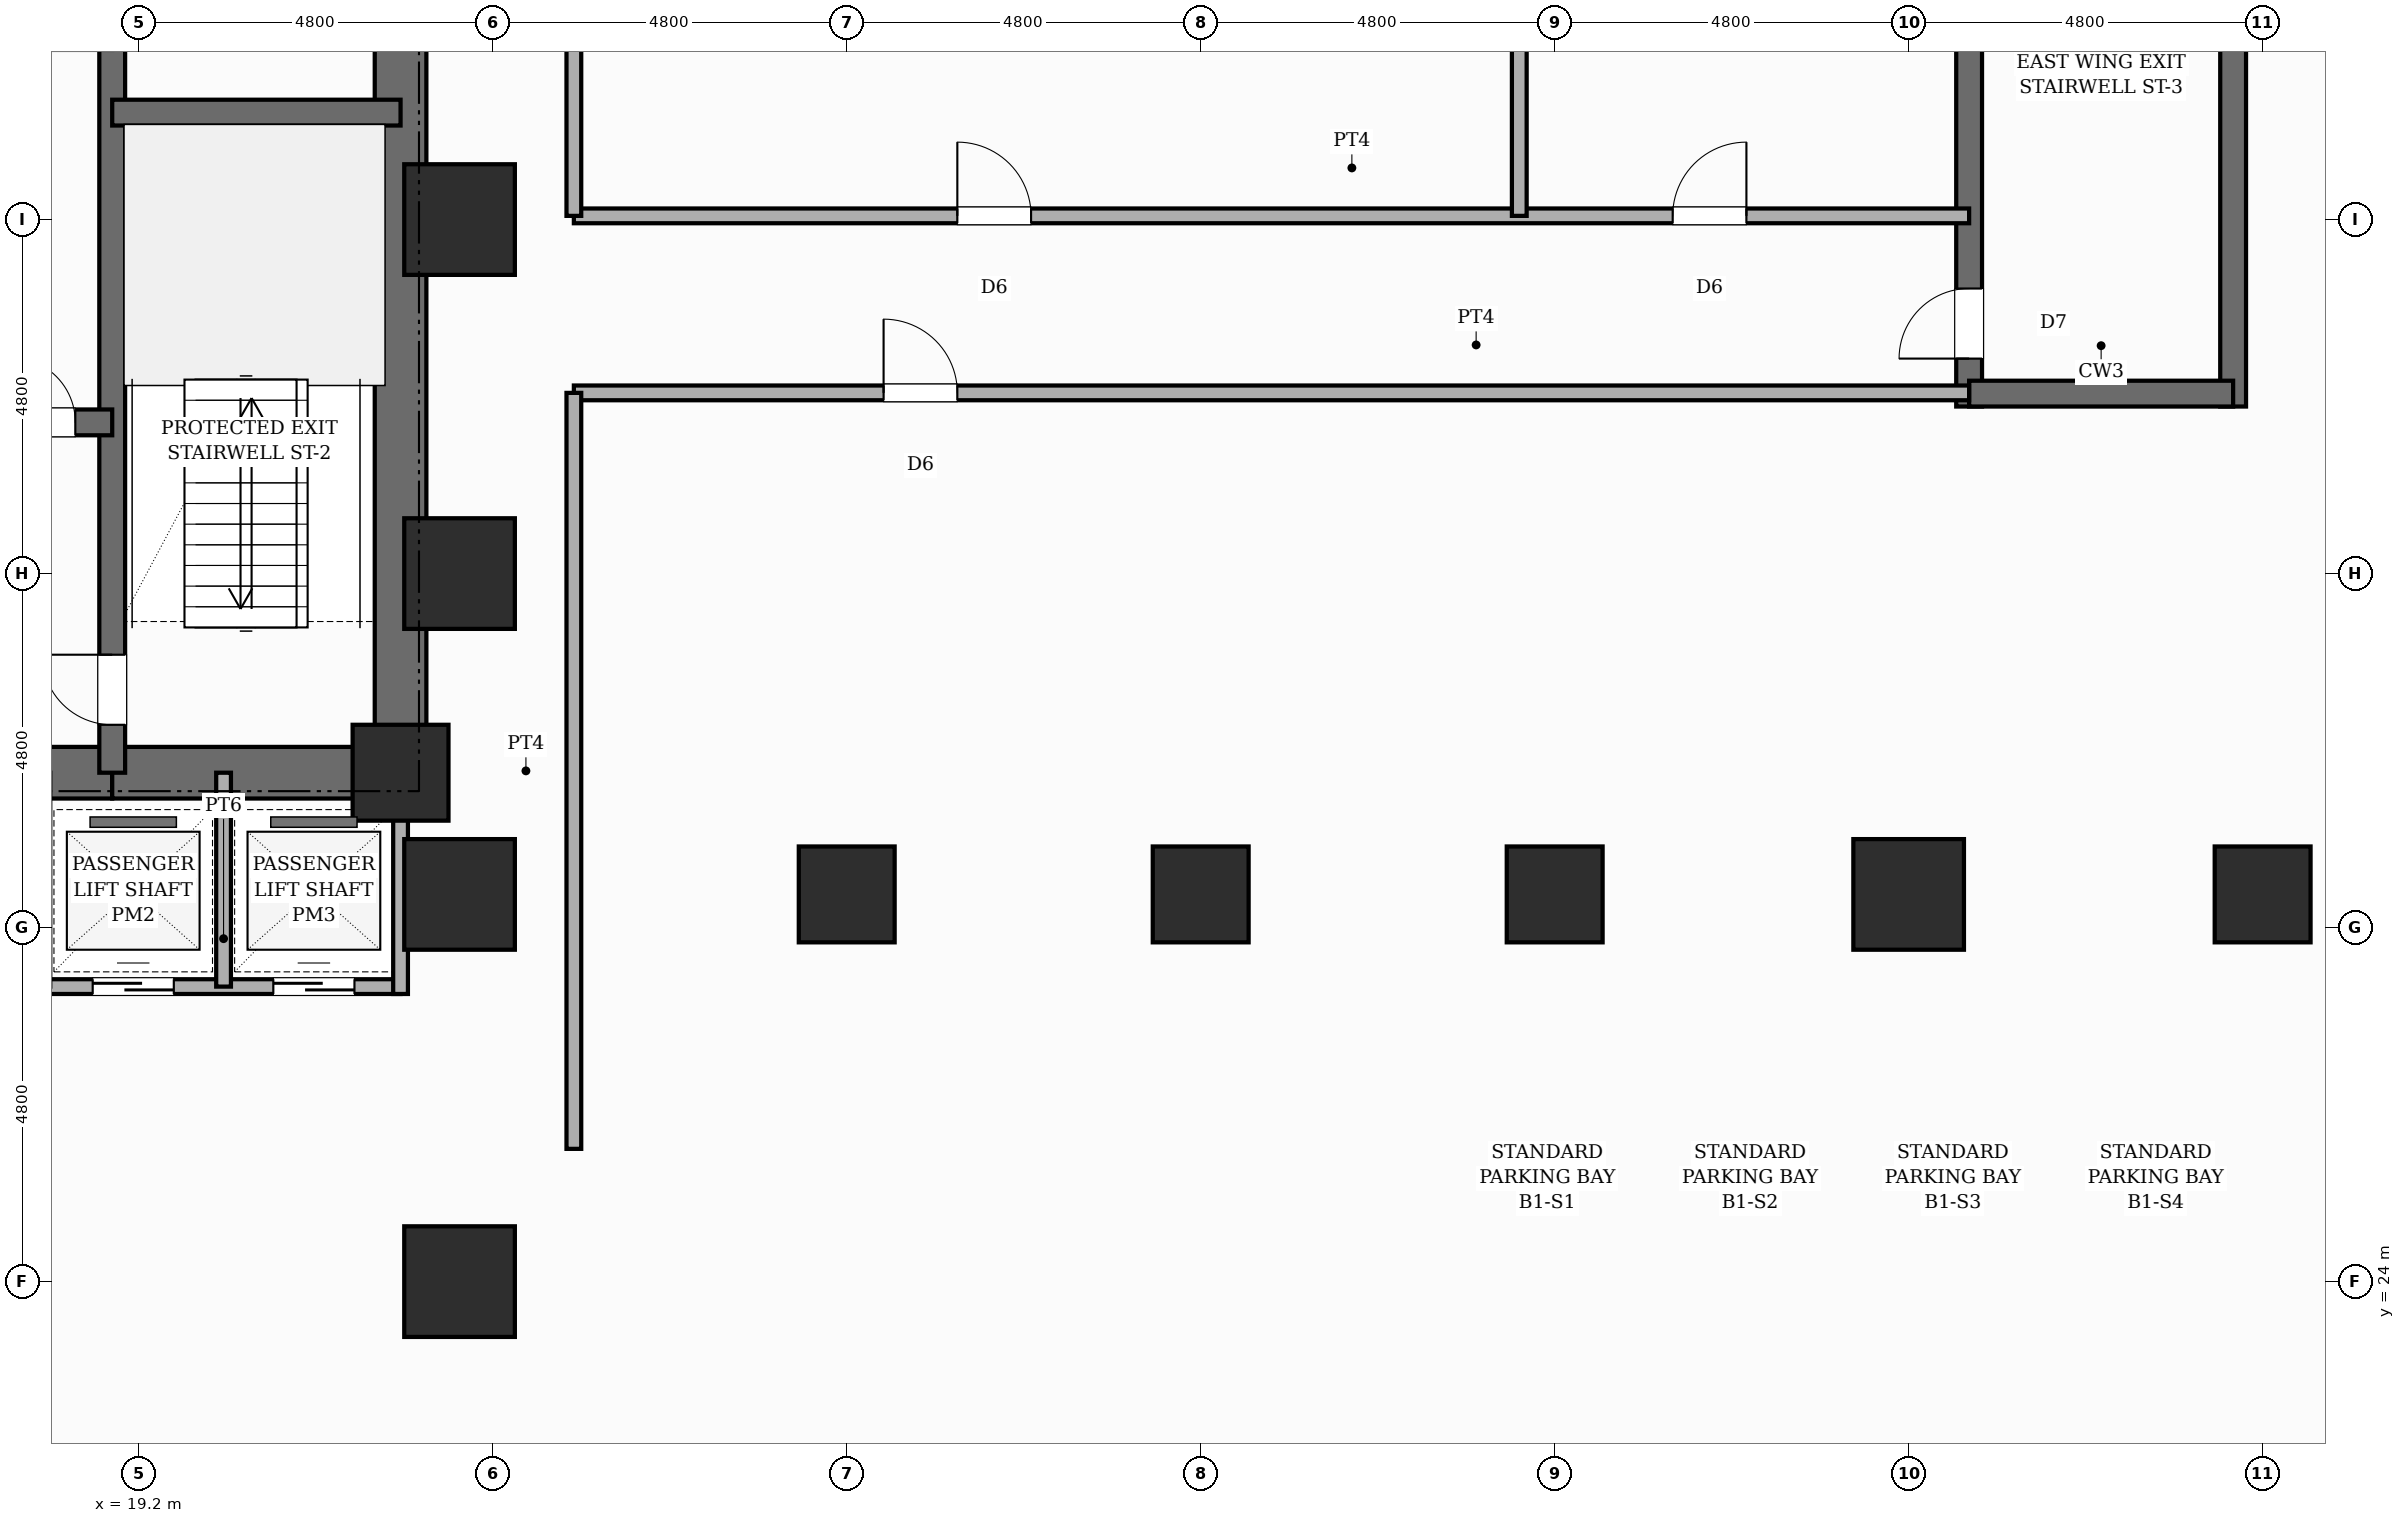
"""IFC4 building model, lengths in metres.
Left out: names, types, materials, properties, quantities, classifications, styles, units other than length and angle.
Written with IfcOpenShell. Run it as: python <this file> out.ifc"""

import sys

from ifc_helpers import new_model, si_unit, direction, frame, frame_2d, origin, origin_2d, place, context, subcontext, project, spatial, rectangle, extrude, element, fill, save


model = new_model("IFC4")
c1 = context("Model", 3, precision=1e-05, world=origin(), true_north=direction((0.0, 1.0)))
c2 = subcontext(c1, "Body", "Model", "MODEL_VIEW")
j1 = project(units=[si_unit("LENGTHUNIT", "METRE"), si_unit("PLANEANGLEUNIT", "RADIAN")], contexts=[c1])
p1 = place(None, origin())
s1 = spatial("IfcSite", under=j1, at=p1, CompositionType="ELEMENT")
p2 = place(p1, origin())
s2 = spatial("IfcBuilding", under=s1, at=p2, CompositionType="ELEMENT")
p3 = place(p2, frame((0.0, 0.0, -4.4)))
s3 = spatial("IfcBuildingStorey", under=s2, at=p3, CompositionType="ELEMENT", Elevation=-4.4)
p4 = place(p3, frame((22.75, 30.55, 0.0), z_axis=(0.0, 0.0, 1.0), x_axis=(0.0, 1.0, 0.0)))
e1 = element("IfcWall", 1, at=p4, inside=s3, PredefinedType="SHEAR", context=c2, shape_type="SweptSolid", body=[
    extrude(rectangle(XDim=15.6, YDim=0.7, at=frame_2d((7.8, 0.0))), origin(), (0.0, 0.0, 1.0), 4.4),
])
p5 = place(p4, frame((10.8, 0.0, 0.0)))
e2 = element("IfcOpeningElement", 2, at=p5, cuts=e1, PredefinedType="OPENING", context=c2, shape_type="SweptSolid", body=[
    extrude(rectangle(XDim=1.0, YDim=2.15, at=frame_2d((0.5, 1.075))), frame((0.0, 0.36, 0.0), z_axis=(0.0, -1.0, 0.0), x_axis=(1.0, 0.0, 0.0)), (0.0, 0.0, 1.0), 0.72),
])
p6 = place(p3, frame((9.96, 30.9, 0.0), z_axis=(0.0, 0.0, 1.0), x_axis=(1.0, 0.0, 0.0)))
e3 = element("IfcWall", 3, at=p6, inside=s3, PredefinedType="SHEAR", context=c2, shape_type="SweptSolid", body=[
    extrude(rectangle(XDim=8.88, YDim=0.7, at=frame_2d((4.44, 0.0))), origin(), (0.0, 0.0, 1.0), 4.4),
])
p7 = place(p6, frame((4.09, 0.0, 0.0)))
e4 = element("IfcOpeningElement", 4, at=p7, cuts=e3, PredefinedType="OPENING", context=c2, shape_type="SweptSolid", body=[
    extrude(rectangle(XDim=1.0, YDim=2.15, at=frame_2d((0.5, 1.075))), frame((0.0, 0.36, 0.0), z_axis=(0.0, -1.0, 0.0), x_axis=(1.0, 0.0, 0.0)), (0.0, 0.0, 1.0), 0.72),
])
p8 = place(p3, frame((18.84, 30.9, 0.0), z_axis=(0.0, 0.0, 1.0), x_axis=(1.0, 0.0, 0.0)))
e5 = element("IfcWall", 5, at=p8, inside=s3, PredefinedType="SHEAR", context=c2, shape_type="SweptSolid", body=[
    extrude(rectangle(XDim=3.91, YDim=0.7, at=frame_2d((1.955, 0.0))), origin(), (0.0, 0.0, 1.0), 4.4),
])
p9 = place(p3, frame((18.84, 30.9, 0.0), z_axis=(0.0, 0.0, 1.0), x_axis=(0.0, 1.0, 0.0)))
e6 = element("IfcWall", 6, at=p9, inside=s3, PredefinedType="SHEAR", context=c2, shape_type="SweptSolid", body=[
    extrude(rectangle(XDim=14.9, YDim=0.35, at=frame_2d((7.45, 0.0))), origin(), (0.0, 0.0, 1.0), 4.4),
])
p10 = place(p9, frame((0.65, 0.0, 0.0)))
e7 = element("IfcOpeningElement", 7, at=p10, cuts=e6, PredefinedType="OPENING", context=c2, shape_type="SweptSolid", body=[
    extrude(rectangle(XDim=0.95, YDim=2.1, at=frame_2d((0.475, 1.05))), frame((0.0, 0.185, 0.0), z_axis=(0.0, -1.0, 0.0), x_axis=(1.0, 0.0, 0.0)), (0.0, 0.0, 1.0), 0.37),
])
p11 = place(p9, frame((10.45, 0.0, 0.0)))
e8 = element("IfcOpeningElement", 8, at=p11, cuts=e6, PredefinedType="OPENING", context=c2, shape_type="SweptSolid", body=[
    extrude(rectangle(XDim=1.0, YDim=2.15, at=frame_2d((0.5, 1.075))), frame((0.0, 0.185, 0.0), z_axis=(0.0, -1.0, 0.0), x_axis=(1.0, 0.0, 0.0)), (0.0, 0.0, 1.0), 0.37),
])
p12 = place(p3, frame((18.84, 39.85, 0.0), z_axis=(0.0, 0.0, 1.0), x_axis=(1.0, 0.0, 0.0)))
e9 = element("IfcWall", 9, at=p12, inside=s3, PredefinedType="SHEAR", context=c2, shape_type="SweptSolid", body=[
    extrude(rectangle(XDim=3.91, YDim=0.35, at=frame_2d((1.955, 0.0))), origin(), (0.0, 0.0, 1.0), 4.4),
])
p13 = place(p3, frame((9.96, 35.65, 0.0), z_axis=(0.0, 0.0, 1.0), x_axis=(1.0, 0.0, 0.0)))
e10 = element("IfcWall", 10, at=p13, inside=s3, PredefinedType="SHEAR", context=c2, shape_type="SweptSolid", body=[
    extrude(rectangle(XDim=8.88, YDim=0.35, at=frame_2d((4.44, 0.0))), origin(), (0.0, 0.0, 1.0), 4.4),
])
p14 = place(p13, frame((0.84, 0.0, 0.0)))
e11 = element("IfcOpeningElement", 11, at=p14, cuts=e10, PredefinedType="OPENING", context=c2, shape_type="SweptSolid", body=[
    extrude(rectangle(XDim=1.1, YDim=2.15, at=frame_2d((0.55, 1.075))), frame((0.0, 0.185, 0.0), z_axis=(0.0, -1.0, 0.0), x_axis=(1.0, 0.0, 0.0)), (0.0, 0.0, 1.0), 0.37),
])
p15 = place(p13, frame((5.24, 0.0, 0.0)))
e12 = element("IfcOpeningElement", 12, at=p15, cuts=e10, PredefinedType="OPENING", context=c2, shape_type="SweptSolid", body=[
    extrude(rectangle(XDim=1.1, YDim=2.15, at=frame_2d((0.55, 1.075))), frame((0.0, 0.185, 0.0), z_axis=(0.0, -1.0, 0.0), x_axis=(1.0, 0.0, 0.0)), (0.0, 0.0, 1.0), 0.37),
])
p16 = place(p13, frame((7.5, 0.0, 0.0)))
e13 = element("IfcOpeningElement", 13, at=p16, cuts=e10, PredefinedType="OPENING", context=c2, shape_type="SweptSolid", body=[
    extrude(rectangle(XDim=0.88, YDim=2.1, at=frame_2d((0.44, 1.05))), frame((0.0, 0.185, 0.0), z_axis=(0.0, -1.0, 0.0), x_axis=(1.0, 0.0, 0.0)), (0.0, 0.0, 1.0), 0.37),
])
p17 = place(p3, frame((44.02, 35.865, 0.0), z_axis=(0.0, 0.0, 1.0), x_axis=(0.0, 1.0, 0.0)))
e14 = element("IfcWall", 14, at=p17, inside=s3, PredefinedType="SHEAR", context=c2, shape_type="SweptSolid", body=[
    extrude(rectangle(XDim=8.97, YDim=0.35, at=frame_2d((4.485, 0.0))), origin(), (0.0, 0.0, 1.0), 4.4),
])
p18 = place(p17, frame((0.65, 0.0, 0.0)))
e15 = element("IfcOpeningElement", 15, at=p18, cuts=e14, PredefinedType="OPENING", context=c2, shape_type="SweptSolid", body=[
    extrude(rectangle(XDim=0.95, YDim=2.1, at=frame_2d((0.475, 1.05))), frame((0.0, 0.185, 0.0), z_axis=(0.0, -1.0, 0.0), x_axis=(1.0, 0.0, 0.0)), (0.0, 0.0, 1.0), 0.37),
])
p19 = place(p3, frame((47.6, 35.865, 0.0), z_axis=(0.0, 0.0, 1.0), x_axis=(0.0, 1.0, 0.0)))
e16 = element("IfcWall", 16, at=p19, inside=s3, PredefinedType="SHEAR", context=c2, shape_type="SweptSolid", body=[
    extrude(rectangle(XDim=8.97, YDim=0.35, at=frame_2d((4.485, 0.0))), origin(), (0.0, 0.0, 1.0), 4.4),
])
p20 = place(p3, frame((44.02, 36.04, 0.0), z_axis=(0.0, 0.0, 1.0), x_axis=(1.0, 0.0, 0.0)))
e17 = element("IfcWall", 17, at=p20, inside=s3, PredefinedType="SHEAR", context=c2, shape_type="SweptSolid", body=[
    extrude(rectangle(XDim=3.58, YDim=0.35, at=frame_2d((1.79, 0.0))), origin(), (0.0, 0.0, 1.0), 4.4),
])
p21 = place(p3, frame((22.75, 30.9, 0.0), z_axis=(0.0, 0.0, 1.0), x_axis=(1.0, 0.0, 0.0)))
e18 = element("IfcColumn", 18, at=p21, inside=s3, PredefinedType="COLUMN", context=c2, shape_type="SweptSolid", body=[
    extrude(rectangle(XDim=1.3, YDim=1.3, at=origin_2d()), origin(), (0.0, 0.0, 1.0), 4.4),
])
for number, where, z_axis, x_axis in (
    (19, (23.55, 24.0, 0.0), (0.0, 0.0, 1.0), (1.0, 0.0, 0.0)),
    (20, (23.55, 29.25, 0.0), (0.0, 0.0, 1.0), (1.0, 0.0, 0.0)),
    (21, (23.55, 33.6, 0.0), (0.0, 0.0, 1.0), (1.0, 0.0, 0.0)),
    (22, (23.55, 38.4, 0.0), (0.0, 0.0, 1.0), (1.0, 0.0, 0.0)),
):
    element("IfcColumn", number, at=place(p3, frame(where, z_axis=z_axis, x_axis=x_axis)), inside=s3, PredefinedType="USERDEFINED", context=c2, shape_type="SweptSolid", body=[
        extrude(rectangle(XDim=1.5, YDim=1.5, at=origin_2d()), origin(), (0.0, 0.0, 1.0), 4.4),
    ])
for number, where, z_axis, x_axis in (
    (23, (28.8, 29.25, 0.0), (0.0, 0.0, 1.0), (1.0, 0.0, 0.0)),
    (24, (33.6, 29.25, 0.0), (0.0, 0.0, 1.0), (1.0, 0.0, 0.0)),
    (25, (38.4, 29.25, 0.0), (0.0, 0.0, 1.0), (1.0, 0.0, 0.0)),
):
    element("IfcColumn", number, at=place(p3, frame(where, z_axis=z_axis, x_axis=x_axis)), inside=s3, PredefinedType="COLUMN", context=c2, shape_type="SweptSolid", body=[
        extrude(rectangle(XDim=1.3, YDim=1.3, at=origin_2d()), origin(), (0.0, 0.0, 1.0), 4.4),
    ])
p22 = place(p3, frame((43.2, 29.25, 0.0), z_axis=(0.0, 0.0, 1.0), x_axis=(1.0, 0.0, 0.0)))
e26 = element("IfcColumn", 26, at=p22, inside=s3, PredefinedType="USERDEFINED", context=c2, shape_type="SweptSolid", body=[
    extrude(rectangle(XDim=1.5, YDim=1.5, at=origin_2d()), origin(), (0.0, 0.0, 1.0), 4.4),
])
p23 = place(p3, frame((48.0, 29.25, 0.0), z_axis=(0.0, 0.0, 1.0), x_axis=(1.0, 0.0, 0.0)))
e27 = element("IfcColumn", 27, at=p23, inside=s3, PredefinedType="COLUMN", context=c2, shape_type="SweptSolid", body=[
    extrude(rectangle(XDim=1.3, YDim=1.3, at=origin_2d()), origin(), (0.0, 0.0, 1.0), 4.4),
])
p24 = place(p3, frame((15.5, 28.0, 0.0), z_axis=(0.0, 0.0, 1.0), x_axis=(1.0, 0.0, 0.0)))
e28 = element("IfcWall", 28, at=p24, inside=s3, PredefinedType="POLYGONAL", context=c2, shape_type="SweptSolid", body=[
    extrude(rectangle(XDim=7.25, YDim=0.2, at=frame_2d((3.625, 0.0))), origin(), (0.0, 0.0, 1.0), 4.05),
])
p25 = place(p24, frame((0.625, 0.0, 0.0)))
e29 = element("IfcOpeningElement", 29, at=p25, cuts=e28, PredefinedType="OPENING", context=c2, shape_type="SweptSolid", body=[
    extrude(rectangle(XDim=1.1, YDim=2.15, at=frame_2d((0.55, 1.075))), frame((0.0, 0.11, 0.0), z_axis=(0.0, -1.0, 0.0), x_axis=(1.0, 0.0, 0.0)), (0.0, 0.0, 1.0), 0.22),
])
p26 = place(p24, frame((3.075, 0.0, 0.0)))
e30 = element("IfcOpeningElement", 30, at=p26, cuts=e28, PredefinedType="OPENING", context=c2, shape_type="SweptSolid", body=[
    extrude(rectangle(XDim=1.1, YDim=2.15, at=frame_2d((0.55, 1.075))), frame((0.0, 0.11, 0.0), z_axis=(0.0, -1.0, 0.0), x_axis=(1.0, 0.0, 0.0)), (0.0, 0.0, 1.0), 0.22),
])
p27 = place(p24, frame((5.525, 0.0, 0.0)))
e31 = element("IfcOpeningElement", 31, at=p27, cuts=e28, PredefinedType="OPENING", context=c2, shape_type="SweptSolid", body=[
    extrude(rectangle(XDim=1.1, YDim=2.15, at=frame_2d((0.55, 1.075))), frame((0.0, 0.11, 0.0), z_axis=(0.0, -1.0, 0.0), x_axis=(1.0, 0.0, 0.0)), (0.0, 0.0, 1.0), 0.22),
])
p28 = place(p3, frame((22.75, 27.9, 0.0), z_axis=(0.0, 0.0, 1.0), x_axis=(0.0, 1.0, 0.0)))
e32 = element("IfcWall", 32, at=p28, inside=s3, PredefinedType="POLYGONAL", context=c2, shape_type="SweptSolid", body=[
    extrude(rectangle(XDim=3.0, YDim=0.2, at=frame_2d((1.5, 0.0))), origin(), (0.0, 0.0, 1.0), 4.05),
])
p29 = place(p3, frame((20.35, 28.0, 0.0), z_axis=(0.0, 0.0, 1.0), x_axis=(0.0, 1.0, 0.0)))
e33 = element("IfcWall", 33, at=p29, inside=s3, PredefinedType="POLYGONAL", context=c2, shape_type="SweptSolid", body=[
    extrude(rectangle(XDim=2.9, YDim=0.2, at=frame_2d((1.45, 0.0))), origin(), (0.0, 0.0, 1.0), 4.05),
])
p30 = place(p3, frame((25.1, 36.05, 0.0), z_axis=(0.0, 0.0, 1.0), x_axis=(1.0, 0.0, 0.0)))
e34 = element("IfcWall", 34, at=p30, inside=s3, PredefinedType="PARTITIONING", context=c2, shape_type="SweptSolid", body=[
    extrude(rectangle(XDim=18.92, YDim=0.2, at=frame_2d((9.46, 0.0))), origin(), (0.0, 0.0, 1.0), 4.05),
])
p31 = place(p30, frame((4.2, 0.0, 0.0)))
e35 = element("IfcOpeningElement", 35, at=p31, cuts=e34, PredefinedType="OPENING", context=c2, shape_type="SweptSolid", body=[
    extrude(rectangle(XDim=1.0, YDim=2.15, at=frame_2d((0.5, 1.075))), frame((0.0, 0.11, 0.0), z_axis=(0.0, -1.0, 0.0), x_axis=(1.0, 0.0, 0.0)), (0.0, 0.0, 1.0), 0.22),
])
p32 = place(p3, frame((25.1, 38.45, 0.0), z_axis=(0.0, 0.0, 1.0), x_axis=(1.0, 0.0, 0.0)))
e36 = element("IfcWall", 36, at=p32, inside=s3, PredefinedType="PARTITIONING", context=c2, shape_type="SweptSolid", body=[
    extrude(rectangle(XDim=18.92, YDim=0.2, at=frame_2d((9.46, 0.0))), origin(), (0.0, 0.0, 1.0), 4.05),
])
p33 = place(p32, frame((5.2, 0.0, 0.0)))
e37 = element("IfcOpeningElement", 37, at=p33, cuts=e36, PredefinedType="OPENING", context=c2, shape_type="SweptSolid", body=[
    extrude(rectangle(XDim=1.0, YDim=2.15, at=frame_2d((0.5, 1.075))), frame((0.0, 0.11, 0.0), z_axis=(0.0, -1.0, 0.0), x_axis=(1.0, 0.0, 0.0)), (0.0, 0.0, 1.0), 0.22),
])
p34 = place(p32, frame((14.9, 0.0, 0.0)))
e38 = element("IfcOpeningElement", 38, at=p34, cuts=e36, PredefinedType="OPENING", context=c2, shape_type="SweptSolid", body=[
    extrude(rectangle(XDim=1.0, YDim=2.15, at=frame_2d((0.5, 1.075))), frame((0.0, 0.11, 0.0), z_axis=(0.0, -1.0, 0.0), x_axis=(1.0, 0.0, 0.0)), (0.0, 0.0, 1.0), 0.22),
])
p35 = place(p3, frame((25.1, 25.8, 0.0), z_axis=(0.0, 0.0, 1.0), x_axis=(0.0, 1.0, 0.0)))
e39 = element("IfcWall", 39, at=p35, inside=s3, PredefinedType="PARTITIONING", context=c2, shape_type="SweptSolid", body=[
    extrude(rectangle(XDim=10.25, YDim=0.2, at=frame_2d((5.125, 0.0))), origin(), (0.0, 0.0, 1.0), 4.05),
])
p36 = place(p3, frame((25.1, 38.45, 0.0), z_axis=(0.0, 0.0, 1.0), x_axis=(0.0, 1.0, 0.0)))
e40 = element("IfcWall", 40, at=p36, inside=s3, PredefinedType="PARTITIONING", context=c2, shape_type="SweptSolid", body=[
    extrude(rectangle(XDim=4.6, YDim=0.2, at=frame_2d((2.3, 0.0))), origin(), (0.0, 0.0, 1.0), 4.05),
])
p37 = place(p3, frame((37.92, 38.45, 0.0), z_axis=(0.0, 0.0, 1.0), x_axis=(0.0, 1.0, 0.0)))
e41 = element("IfcWall", 41, at=p37, inside=s3, PredefinedType="PARTITIONING", context=c2, shape_type="SweptSolid", body=[
    extrude(rectangle(XDim=8.95, YDim=0.2, at=frame_2d((4.475, 0.0))), origin(), (0.0, 0.0, 1.0), 3.28),
])
p38 = place(p10, origin())
e42 = element("IfcDoor", 42, at=p38, inside=s3, OperationType="SINGLE_SWING_RIGHT", PredefinedType="DOOR", context=c2, shape_type="SweptSolid", body=[
    extrude(rectangle(XDim=0.95, YDim=2.1, at=frame_2d((0.475, 1.05))), frame((0.0, 0.025, 0.0), z_axis=(0.0, -1.0, 0.0), x_axis=(1.0, 0.0, 0.0)), (0.0, 0.0, 1.0), 0.05),
])
fill(e7, e42)
p39 = place(p18, origin())
e43 = element("IfcDoor", 43, at=p39, inside=s3, OperationType="SINGLE_SWING_LEFT", PredefinedType="DOOR", context=c2, shape_type="SweptSolid", body=[
    extrude(rectangle(XDim=0.95, YDim=2.1, at=frame_2d((0.475, 1.05))), frame((0.0, 0.025, 0.0), z_axis=(0.0, -1.0, 0.0), x_axis=(1.0, 0.0, 0.0)), (0.0, 0.0, 1.0), 0.05),
])
fill(e15, e43)
p40 = place(p16, origin())
e44 = element("IfcDoor", 44, at=p40, inside=s3, OperationType="SINGLE_SWING_LEFT", PredefinedType="DOOR", context=c2, shape_type="SweptSolid", body=[
    extrude(rectangle(XDim=0.88, YDim=2.1, at=frame_2d((0.44, 1.05))), frame((0.0, 0.025, 0.0), z_axis=(0.0, -1.0, 0.0), x_axis=(1.0, 0.0, 0.0)), (0.0, 0.0, 1.0), 0.05),
])
fill(e13, e44)
p41 = place(p26, origin())
e45 = element("IfcDoor", 45, at=p41, inside=s3, OperationType="SLIDING_TO_LEFT", PredefinedType="DOOR", context=c2, shape_type="SweptSolid", body=[
    extrude(rectangle(XDim=1.1, YDim=2.15, at=frame_2d((0.55, 1.075))), frame((0.0, 0.025, 0.0), z_axis=(0.0, -1.0, 0.0), x_axis=(1.0, 0.0, 0.0)), (0.0, 0.0, 1.0), 0.05),
])
fill(e30, e45)
p42 = place(p27, origin())
e46 = element("IfcDoor", 46, at=p42, inside=s3, OperationType="SLIDING_TO_RIGHT", PredefinedType="DOOR", context=c2, shape_type="SweptSolid", body=[
    extrude(rectangle(XDim=1.1, YDim=2.15, at=frame_2d((0.55, 1.075))), frame((0.0, 0.025, 0.0), z_axis=(0.0, -1.0, 0.0), x_axis=(1.0, 0.0, 0.0)), (0.0, 0.0, 1.0), 0.05),
])
fill(e31, e46)
p43 = place(p31, origin())
e47 = element("IfcDoor", 47, at=p43, inside=s3, OperationType="SINGLE_SWING_LEFT", PredefinedType="DOOR", context=c2, shape_type="SweptSolid", body=[
    extrude(rectangle(XDim=1.0, YDim=2.15, at=frame_2d((0.5, 1.075))), frame((0.0, 0.025, 0.0), z_axis=(0.0, -1.0, 0.0), x_axis=(1.0, 0.0, 0.0)), (0.0, 0.0, 1.0), 0.05),
])
fill(e35, e47)
p44 = place(p33, origin())
e48 = element("IfcDoor", 48, at=p44, inside=s3, OperationType="SINGLE_SWING_LEFT", PredefinedType="DOOR", context=c2, shape_type="SweptSolid", body=[
    extrude(rectangle(XDim=1.0, YDim=2.15, at=frame_2d((0.5, 1.075))), frame((0.0, 0.025, 0.0), z_axis=(0.0, -1.0, 0.0), x_axis=(1.0, 0.0, 0.0)), (0.0, 0.0, 1.0), 0.05),
])
fill(e37, e48)
p45 = place(p34, origin())
e49 = element("IfcDoor", 49, at=p45, inside=s3, OperationType="SINGLE_SWING_RIGHT", PredefinedType="DOOR", context=c2, shape_type="SweptSolid", body=[
    extrude(rectangle(XDim=1.0, YDim=2.15, at=frame_2d((0.5, 1.075))), frame((0.0, 0.025, 0.0), z_axis=(0.0, -1.0, 0.0), x_axis=(1.0, 0.0, 0.0)), (0.0, 0.0, 1.0), 0.05),
])
fill(e38, e49)
save(model, sys.argv[1])
